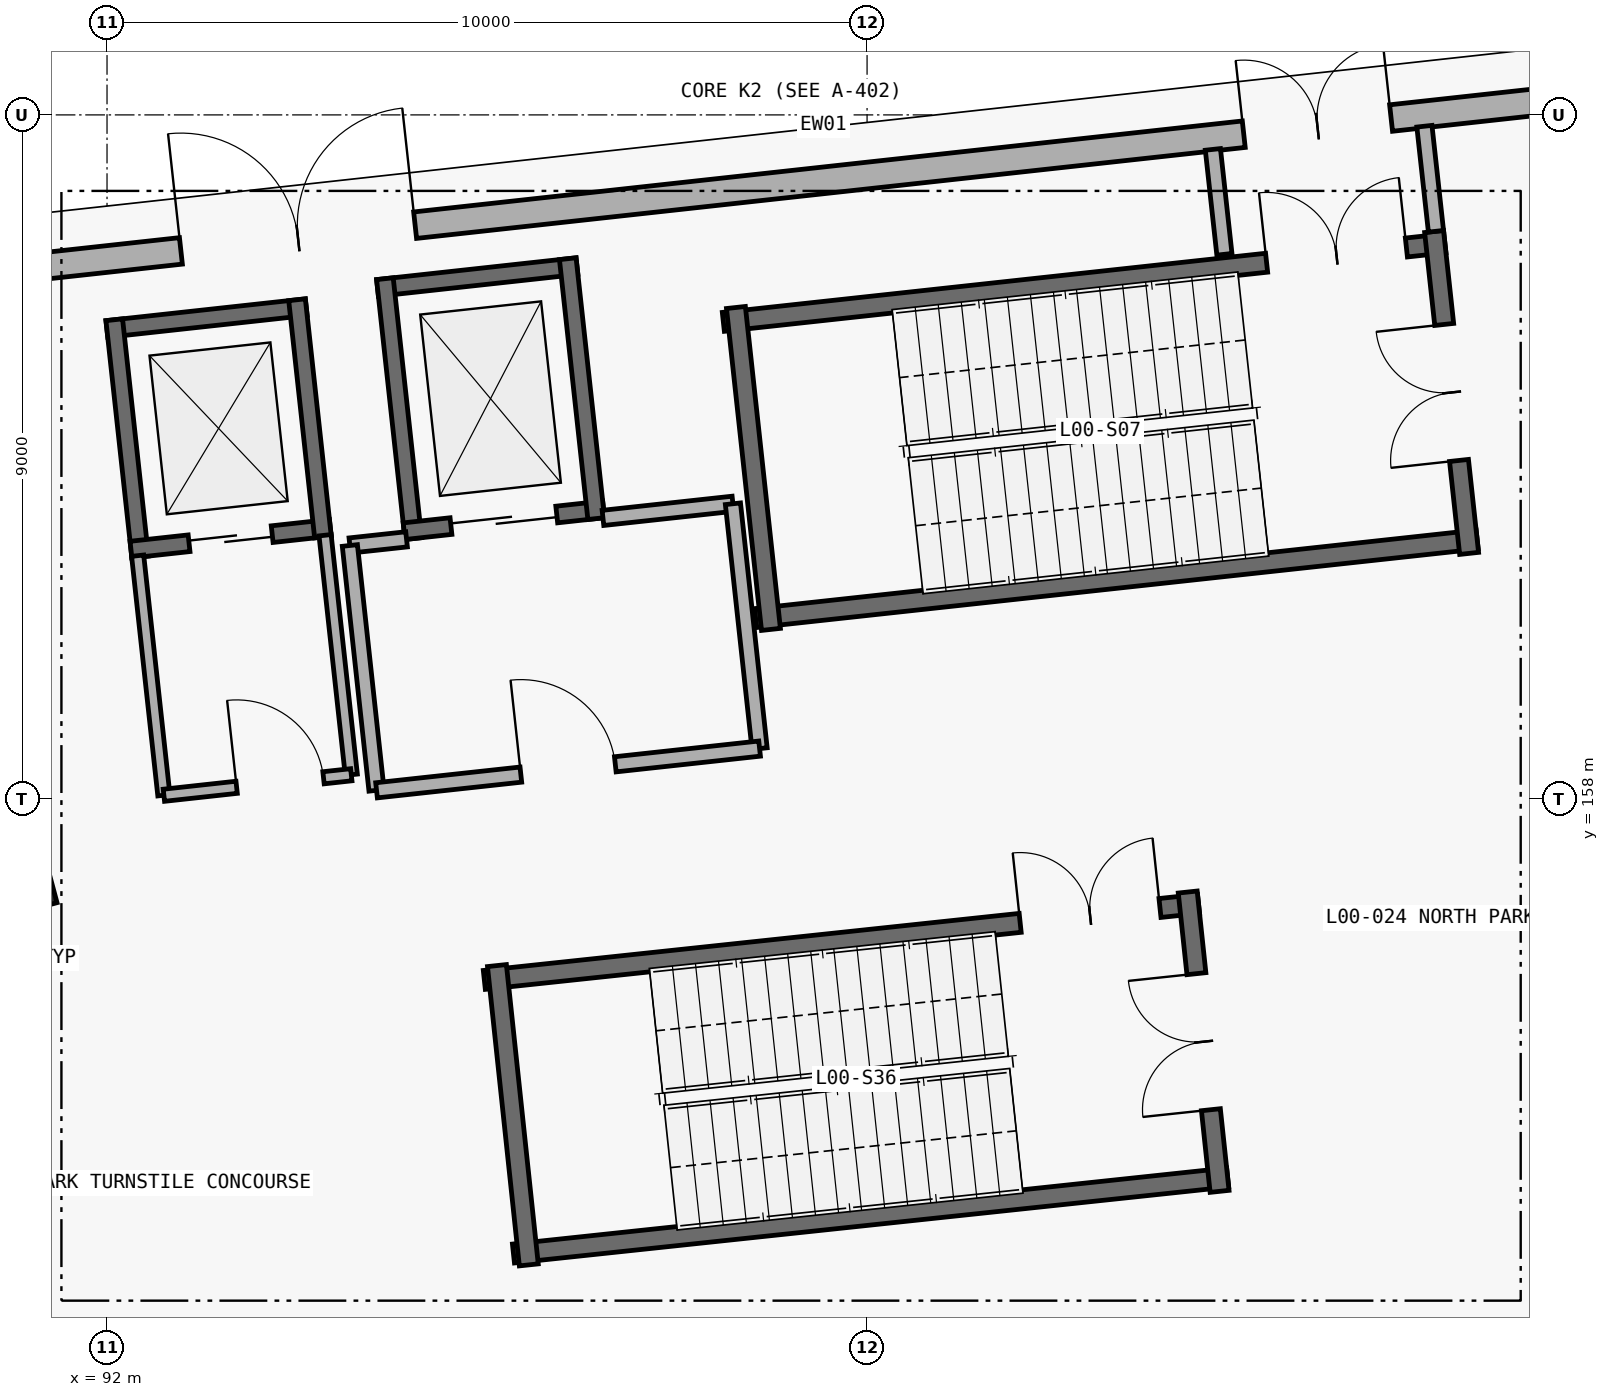
"""IFC4 building model, lengths in metres.
Left out: names, types, materials, properties, quantities, classifications, styles, units other than length and angle.
Written with IfcOpenShell. Run it as: python <this file> out.ifc"""

import sys

from ifc_helpers import new_model, si_unit, direction, frame, frame_2d, origin, origin_2d, place, context, subcontext, project, spatial, rectangle, extrude, element, fill, save


model = new_model("IFC4")
c1 = context("Model", 3, precision=1e-05, world=origin(), true_north=direction((0.0, 1.0)))
c2 = subcontext(c1, "Body", "Model", "MODEL_VIEW")
j1 = project(units=[si_unit("LENGTHUNIT", "METRE"), si_unit("PLANEANGLEUNIT", "RADIAN")], contexts=[c1])
p1 = place(None, origin())
s1 = spatial("IfcSite", under=j1, at=p1, CompositionType="ELEMENT")
p2 = place(p1, origin())
s2 = spatial("IfcBuilding", under=s1, at=p2, CompositionType="ELEMENT")
p3 = place(p2, origin())
s3 = spatial("IfcBuildingStorey", under=s2, at=p3, CompositionType="ELEMENT", Elevation=0.0)
p4 = place(p3, frame((90.699, 157.007, 0.0), z_axis=(0.0, 0.0, 1.0), x_axis=(-0.258819045103, 0.965925826289, 0.0)))
e1 = element("IfcColumn", 1, at=p4, inside=s3, PredefinedType="COLUMN", context=c2, shape_type="SweptSolid", body=[
    extrude(rectangle(XDim=1.05, YDim=1.05, at=origin_2d()), origin(), (0.0, 0.0, 1.0), 5.4),
])
p5 = place(p3, frame((89.157, 164.792, 0.0), z_axis=(0.0, 0.0, 1.0), x_axis=(0.994028735725, 0.10911861689, 0.0)))
e2 = element("IfcWall", 2, at=p5, inside=s3, PredefinedType="STANDARD", context=c2, shape_type="SweptSolid", body=[
    extrude(rectangle(XDim=22.452, YDim=0.35, at=frame_2d((11.226, 0.0))), origin(), (0.0, 0.0, 1.0), 4.165),
])
p6 = place(p5, frame((17.906, 0.0, 0.0)))
e3 = element("IfcOpeningElement", 3, at=p6, cuts=e2, PredefinedType="OPENING", context=c2, shape_type="SweptSolid", body=[
    extrude(rectangle(XDim=1.95, YDim=2.25, at=frame_2d((0.975, 1.125))), frame((0.0, 0.185, 0.0), z_axis=(0.0, -1.0, 0.0), x_axis=(1.0, 0.0, 0.0)), (0.0, 0.0, 1.0), 0.37),
])
p7 = place(p5, frame((3.838, 0.0, 0.0)))
e4 = element("IfcOpeningElement", 4, at=p7, cuts=e2, PredefinedType="OPENING", context=c2, shape_type="SweptSolid", body=[
    extrude(rectangle(XDim=3.1, YDim=2.58, at=frame_2d((1.55, 1.29))), frame((0.0, 0.185, 0.0), z_axis=(0.0, -1.0, 0.0), x_axis=(1.0, 0.0, 0.0)), (0.0, 0.0, 1.0), 0.37),
])
p8 = place(p3, frame((100.109, 164.277, 0.0), z_axis=(0.0, 0.0, 1.0), x_axis=(0.994127555169, 0.108214620337, 0.0)))
e5 = element("IfcWall", 5, at=p8, inside=s3, PredefinedType="SHEAR", context=c2, shape_type="SweptSolid", body=[
    extrude(rectangle(XDim=9.55, YDim=0.25, at=frame_2d((4.775, 0.0))), origin(), (0.0, 0.0, 1.0), 5.1),
])
p9 = place(p8, frame((7.19, 0.0, 0.0)))
e6 = element("IfcOpeningElement", 6, at=p9, cuts=e5, PredefinedType="OPENING", context=c2, shape_type="SweptSolid", body=[
    extrude(rectangle(XDim=1.85, YDim=2.3, at=frame_2d((0.925, 1.15))), frame((0.0, 0.135, 0.0), z_axis=(0.0, -1.0, 0.0), x_axis=(1.0, 0.0, 0.0)), (0.0, 0.0, 1.0), 0.27),
])
p10 = place(p3, frame((100.533, 160.38, 0.0), z_axis=(0.0, 0.0, 1.0), x_axis=(0.994127555169, 0.108214620337, 0.0)))
e7 = element("IfcWall", 7, at=p10, inside=s3, PredefinedType="SHEAR", context=c2, shape_type="SweptSolid", body=[
    extrude(rectangle(XDim=9.55, YDim=0.25, at=frame_2d((4.775, 0.0))), origin(), (0.0, 0.0, 1.0), 5.1),
])
p11 = place(p3, frame((109.921, 161.231, 0.0), z_axis=(0.0, 0.0, 1.0), x_axis=(-0.108198315262, 0.994129329903, 0.0)))
e8 = element("IfcWall", 8, at=p11, inside=s3, PredefinedType="SHEAR", context=c2, shape_type="SweptSolid", body=[
    extrude(rectangle(XDim=4.26, YDim=0.25, at=frame_2d((2.13, 0.0))), origin(), (0.0, 0.0, 1.0), 5.1),
])
p12 = place(p11, frame((1.23, 0.0, 0.0)))
e9 = element("IfcOpeningElement", 9, at=p12, cuts=e8, PredefinedType="OPENING", context=c2, shape_type="SweptSolid", body=[
    extrude(rectangle(XDim=1.8, YDim=2.25, at=frame_2d((0.9, 1.125))), frame((0.0, 0.135, 0.0), z_axis=(0.0, -1.0, 0.0), x_axis=(1.0, 0.0, 0.0)), (0.0, 0.0, 1.0), 0.27),
])
p13 = place(p3, frame((100.274, 164.466, 0.0), z_axis=(0.0, 0.0, 1.0), x_axis=(0.108204479885, -0.994128658944, 0.0)))
e10 = element("IfcWall", 10, at=p13, inside=s3, PredefinedType="SHEAR", context=c2, shape_type="SweptSolid", body=[
    extrude(rectangle(XDim=4.26, YDim=0.25, at=frame_2d((2.13, 0.0))), origin(), (0.0, 0.0, 1.0), 5.1),
])
p14 = place(p3, frame((96.964, 155.62, 0.0), z_axis=(0.0, 0.0, 1.0), x_axis=(0.994379889371, 0.105870844028, 0.0)))
e11 = element("IfcWall", 11, at=p14, inside=s3, PredefinedType="SHEAR", context=c2, shape_type="SweptSolid", body=[
    extrude(rectangle(XDim=9.45, YDim=0.25, at=frame_2d((4.725, 0.0))), origin(), (0.0, 0.0, 1.0), 5.1),
])
p15 = place(p14, frame((7.09, 0.0, 0.0)))
e12 = element("IfcOpeningElement", 12, at=p15, cuts=e11, PredefinedType="OPENING", context=c2, shape_type="SweptSolid", body=[
    extrude(rectangle(XDim=1.85, YDim=2.3, at=frame_2d((0.925, 1.15))), frame((0.0, 0.135, 0.0), z_axis=(0.0, -1.0, 0.0), x_axis=(1.0, 0.0, 0.0)), (0.0, 0.0, 1.0), 0.27),
])
p16 = place(p3, frame((97.347, 152.02, 0.0), z_axis=(0.0, 0.0, 1.0), x_axis=(0.994382608826, 0.105845298736, 0.0)))
e13 = element("IfcWall", 13, at=p16, inside=s3, PredefinedType="SHEAR", context=c2, shape_type="SweptSolid", body=[
    extrude(rectangle(XDim=9.45, YDim=0.25, at=frame_2d((4.725, 0.0))), origin(), (0.0, 0.0, 1.0), 5.1),
])
p17 = place(p3, frame((106.638, 152.838, 0.0), z_axis=(0.0, 0.0, 1.0), x_axis=(-0.105856095603, 0.994381459513, 0.0)))
e14 = element("IfcWall", 14, at=p17, inside=s3, PredefinedType="SHEAR", context=c2, shape_type="SweptSolid", body=[
    extrude(rectangle(XDim=3.96, YDim=0.25, at=frame_2d((1.98, 0.0))), origin(), (0.0, 0.0, 1.0), 5.1),
])
p18 = place(p17, frame((1.08, 0.0, 0.0)))
e15 = element("IfcOpeningElement", 15, at=p18, cuts=e14, PredefinedType="OPENING", context=c2, shape_type="SweptSolid", body=[
    extrude(rectangle(XDim=1.8, YDim=2.25, at=frame_2d((0.9, 1.125))), frame((0.0, 0.135, 0.0), z_axis=(0.0, -1.0, 0.0), x_axis=(1.0, 0.0, 0.0)), (0.0, 0.0, 1.0), 0.27),
])
p19 = place(p3, frame((97.13, 155.808, 0.0), z_axis=(0.0, 0.0, 1.0), x_axis=(0.105856095603, -0.994381459513, 0.0)))
e16 = element("IfcWall", 16, at=p19, inside=s3, PredefinedType="SHEAR", context=c2, shape_type="SweptSolid", body=[
    extrude(rectangle(XDim=3.96, YDim=0.25, at=frame_2d((1.98, 0.0))), origin(), (0.0, 0.0, 1.0), 5.1),
])
p20 = place(p3, frame((109.485, 165.469, 0.0), z_axis=(0.0, 0.0, 1.0), x_axis=(-0.109371701479, 0.994000920983, 0.0)))
e17 = element("IfcWall", 17, at=p20, inside=s3, PredefinedType="PARTITIONING", context=c2, shape_type="SweptSolid", body=[
    extrude(rectangle(XDim=1.391, YDim=0.2, at=frame_2d((0.695, 0.0))), origin(), (0.0, 0.0, 1.0), 4.165),
])
p21 = place(p3, frame((106.701, 165.166, 0.0), z_axis=(0.0, 0.0, 1.0), x_axis=(-0.109022528394, 0.994039279054, 0.0)))
e18 = element("IfcWall", 18, at=p21, inside=s3, PredefinedType="PARTITIONING", context=c2, shape_type="SweptSolid", body=[
    extrude(rectangle(XDim=1.388, YDim=0.2, at=frame_2d((0.694, 0.0))), origin(), (0.0, 0.0, 1.0), 4.165),
])
p22 = place(p3, frame((98.183, 165.011, 0.0), z_axis=(0.0, 0.0, 1.0), x_axis=(-0.994077313431, -0.108675180804, 0.0)))
e19 = element("IfcWall", 19, at=p22, inside=s3, PredefinedType="SHEAR", context=c2, shape_type="SweptSolid", body=[
    extrude(rectangle(XDim=2.64, YDim=0.22, at=frame_2d((1.32, 0.0))), origin(), (0.0, 0.0, 1.0), 5.1),
])
p23 = place(p3, frame((95.656, 164.845, 0.0), z_axis=(0.0, 0.0, 1.0), x_axis=(0.108748511736, -0.994069293961, 0.0)))
e20 = element("IfcWall", 20, at=p23, inside=s3, PredefinedType="SHEAR", context=c2, shape_type="SweptSolid", body=[
    extrude(rectangle(XDim=3.439, YDim=0.22, at=frame_2d((1.72, 0.0))), origin(), (0.0, 0.0, 1.0), 5.1),
])
p24 = place(p3, frame((95.909, 161.523, 0.0), z_axis=(0.0, 0.0, 1.0), x_axis=(0.994067317545, 0.108766576613, 0.0)))
e21 = element("IfcWall", 21, at=p24, inside=s3, PredefinedType="SHEAR", context=c2, shape_type="SweptSolid", body=[
    extrude(rectangle(XDim=2.64, YDim=0.22, at=frame_2d((1.32, 0.0))), origin(), (0.0, 0.0, 1.0), 5.1),
])
p25 = place(p24, frame((0.62, 0.0, 0.0)))
e22 = element("IfcOpeningElement", 22, at=p25, cuts=e21, PredefinedType="OPENING", context=c2, shape_type="SweptSolid", body=[
    extrude(rectangle(XDim=1.4, YDim=2.2, at=frame_2d((0.7, 1.1))), frame((0.0, 0.12, 0.0), z_axis=(0.0, -1.0, 0.0), x_axis=(1.0, 0.0, 0.0)), (0.0, 0.0, 1.0), 0.24),
])
p26 = place(p3, frame((98.436, 161.689, 0.0), z_axis=(0.0, 0.0, 1.0), x_axis=(-0.108748511736, 0.994069293961, 0.0)))
e23 = element("IfcWall", 23, at=p26, inside=s3, PredefinedType="SHEAR", context=c2, shape_type="SweptSolid", body=[
    extrude(rectangle(XDim=3.439, YDim=0.22, at=frame_2d((1.72, 0.0))), origin(), (0.0, 0.0, 1.0), 5.1),
])
p27 = place(p3, frame((95.195, 161.335, 0.0), z_axis=(0.0, 0.0, 1.0), x_axis=(0.994146742738, 0.108038205757, 0.0)))
e24 = element("IfcWall", 24, at=p27, inside=s3, PredefinedType="PARTITIONING", context=c2, shape_type="SweptSolid", body=[
    extrude(rectangle(XDim=0.75, YDim=0.2, at=frame_2d((0.375, 0.0))), origin(), (0.0, 0.0, 1.0), 5.08),
])
p28 = place(p3, frame((98.525, 161.698, 0.0), z_axis=(0.0, 0.0, 1.0), x_axis=(0.994135511072, 0.108141507414, 0.0)))
e25 = element("IfcWall", 25, at=p28, inside=s3, PredefinedType="PARTITIONING", context=c2, shape_type="SweptSolid", body=[
    extrude(rectangle(XDim=1.72, YDim=0.2, at=frame_2d((0.86, 0.0))), origin(), (0.0, 0.0, 1.0), 5.08),
])
for number, where, z_axis, x_axis in (
    (26, (95.195, 161.335, 0.0), (0.0, 0.0, 1.0), (0.108, -0.994, 0.0)),
    (27, (100.235, 161.884, 0.0), (0.0, 0.0, 1.0), (0.108, -0.994, 0.0)),
):
    element("IfcWall", number, at=place(p3, frame(where, z_axis=z_axis, x_axis=x_axis)), inside=s3, PredefinedType="PARTITIONING", context=c2, shape_type="SweptSolid", body=[
        extrude(rectangle(XDim=3.24, YDim=0.2, at=frame_2d((1.62, 0.0))), origin(), (0.0, 0.0, 1.0), 5.08),
    ])
p29 = place(p3, frame((95.546, 158.114, 0.0), z_axis=(0.0, 0.0, 1.0), x_axis=(0.994118117986, 0.108301281116, 0.0)))
e28 = element("IfcWall", 28, at=p29, inside=s3, PredefinedType="PARTITIONING", context=c2, shape_type="SweptSolid", body=[
    extrude(rectangle(XDim=5.07, YDim=0.2, at=frame_2d((2.535, 0.0))), origin(), (0.0, 0.0, 1.0), 5.08),
])
p30 = place(p29, frame((1.91, 0.0, 0.0)))
e29 = element("IfcOpeningElement", 29, at=p30, cuts=e28, PredefinedType="OPENING", context=c2, shape_type="SweptSolid", body=[
    extrude(rectangle(XDim=1.25, YDim=2.2, at=frame_2d((0.625, 1.1))), frame((0.0, 0.11, 0.0), z_axis=(0.0, -1.0, 0.0), x_axis=(1.0, 0.0, 0.0)), (0.0, 0.0, 1.0), 0.22),
])
p31 = place(p3, frame((94.621, 164.471, 0.0), z_axis=(0.0, 0.0, 1.0), x_axis=(-0.994072941705, -0.108715162556, 0.0)))
e30 = element("IfcWall", 30, at=p31, inside=s3, PredefinedType="SHEAR", context=c2, shape_type="SweptSolid", body=[
    extrude(rectangle(XDim=2.639, YDim=0.22, at=frame_2d((1.319, 0.0))), origin(), (0.0, 0.0, 1.0), 5.1),
])
p32 = place(p3, frame((92.095, 164.305, 0.0), z_axis=(0.0, 0.0, 1.0), x_axis=(0.108638937738, -0.99408127495, 0.0)))
e31 = element("IfcWall", 31, at=p32, inside=s3, PredefinedType="SHEAR", context=c2, shape_type="SweptSolid", body=[
    extrude(rectangle(XDim=3.139, YDim=0.22, at=frame_2d((1.57, 0.0))), origin(), (0.0, 0.0, 1.0), 5.1),
])
p33 = place(p3, frame((92.315, 161.281, 0.0), z_axis=(0.0, 0.0, 1.0), x_axis=(0.994062938508, 0.108806591184, 0.0)))
e32 = element("IfcWall", 32, at=p33, inside=s3, PredefinedType="SHEAR", context=c2, shape_type="SweptSolid", body=[
    extrude(rectangle(XDim=2.639, YDim=0.22, at=frame_2d((1.319, 0.0))), origin(), (0.0, 0.0, 1.0), 5.1),
])
p34 = place(p33, frame((0.769, 0.0, 0.0)))
e33 = element("IfcOpeningElement", 33, at=p34, cuts=e32, PredefinedType="OPENING", context=c2, shape_type="SweptSolid", body=[
    extrude(rectangle(XDim=1.1, YDim=2.15, at=frame_2d((0.55, 1.075))), frame((0.0, 0.12, 0.0), z_axis=(0.0, -1.0, 0.0), x_axis=(1.0, 0.0, 0.0)), (0.0, 0.0, 1.0), 0.24),
])
p35 = place(p3, frame((94.841, 161.447, 0.0), z_axis=(0.0, 0.0, 1.0), x_axis=(-0.108630539984, 0.99408219267, 0.0)))
e34 = element("IfcWall", 34, at=p35, inside=s3, PredefinedType="SHEAR", context=c2, shape_type="SweptSolid", body=[
    extrude(rectangle(XDim=3.14, YDim=0.22, at=frame_2d((1.57, 0.0))), origin(), (0.0, 0.0, 1.0), 5.1),
])
p36 = place(p3, frame((92.403, 161.201, 0.0), z_axis=(0.0, 0.0, 1.0), x_axis=(0.108800302456, -0.99406362683, 0.0)))
e35 = element("IfcWall", 35, at=p36, inside=s3, PredefinedType="PARTITIONING", context=c2, shape_type="SweptSolid", body=[
    extrude(rectangle(XDim=3.171, YDim=0.16, at=frame_2d((1.585, 0.0))), origin(), (0.0, 0.0, 1.0), 5.08),
])
p37 = place(p3, frame((94.869, 161.47, 0.0), z_axis=(0.0, 0.0, 1.0), x_axis=(0.108909733757, -0.994051643474, 0.0)))
e36 = element("IfcWall", 36, at=p37, inside=s3, PredefinedType="PARTITIONING", context=c2, shape_type="SweptSolid", body=[
    extrude(rectangle(XDim=3.17, YDim=0.16, at=frame_2d((1.585, 0.0))), origin(), (0.0, 0.0, 1.0), 5.08),
])
p38 = place(p3, frame((92.748, 158.049, 0.0), z_axis=(0.0, 0.0, 1.0), x_axis=(0.994058887757, 0.1088435927, 0.0)))
e37 = element("IfcWall", 37, at=p38, inside=s3, PredefinedType="PARTITIONING", context=c2, shape_type="SweptSolid", body=[
    extrude(rectangle(XDim=2.481, YDim=0.16, at=frame_2d((1.24, 0.0))), origin(), (0.0, 0.0, 1.0), 5.08),
])
p39 = place(p38, frame((0.963, 0.0, 0.0)))
e38 = element("IfcOpeningElement", 38, at=p39, cuts=e37, PredefinedType="OPENING", context=c2, shape_type="SweptSolid", body=[
    extrude(rectangle(XDim=1.15, YDim=2.2, at=frame_2d((0.575, 1.1))), frame((0.0, 0.09, 0.0), z_axis=(0.0, -1.0, 0.0), x_axis=(1.0, 0.0, 0.0)), (0.0, 0.0, 1.0), 0.18),
])
p40 = place(p6, origin())
e39 = element("IfcDoor", 39, at=p40, inside=s3, OperationType="DOUBLE_DOOR_SINGLE_SWING", PredefinedType="DOOR", context=c2, shape_type="SweptSolid", body=[
    extrude(rectangle(XDim=1.95, YDim=2.25, at=frame_2d((0.975, 1.125))), frame((0.0, 0.025, 0.0), z_axis=(0.0, -1.0, 0.0), x_axis=(1.0, 0.0, 0.0)), (0.0, 0.0, 1.0), 0.05),
])
fill(e3, e39)
p41 = place(p7, origin())
e40 = element("IfcDoor", 40, at=p41, inside=s3, OperationType="DOUBLE_DOOR_SINGLE_SWING", PredefinedType="DOOR", context=c2, shape_type="SweptSolid", body=[
    extrude(rectangle(XDim=3.1, YDim=2.58, at=frame_2d((1.55, 1.29))), frame((0.0, 0.025, 0.0), z_axis=(0.0, -1.0, 0.0), x_axis=(1.0, 0.0, 0.0)), (0.0, 0.0, 1.0), 0.05),
])
fill(e4, e40)
p42 = place(p12, origin())
e41 = element("IfcDoor", 41, at=p42, inside=s3, OperationType="DOUBLE_DOOR_SINGLE_SWING", PredefinedType="DOOR", context=c2, shape_type="SweptSolid", body=[
    extrude(rectangle(XDim=1.8, YDim=2.25, at=frame_2d((0.9, 1.125))), frame((0.0, 0.025, 0.0), z_axis=(0.0, -1.0, 0.0), x_axis=(1.0, 0.0, 0.0)), (0.0, 0.0, 1.0), 0.05),
])
fill(e9, e41)
p43 = place(p9, origin())
e42 = element("IfcDoor", 42, at=p43, inside=s3, OperationType="DOUBLE_DOOR_SINGLE_SWING", PredefinedType="DOOR", context=c2, shape_type="SweptSolid", body=[
    extrude(rectangle(XDim=1.85, YDim=2.3, at=frame_2d((0.925, 1.15))), frame((0.0, 0.025, 0.0), z_axis=(0.0, -1.0, 0.0), x_axis=(1.0, 0.0, 0.0)), (0.0, 0.0, 1.0), 0.05),
])
fill(e6, e42)
p44 = place(p18, origin())
e43 = element("IfcDoor", 43, at=p44, inside=s3, OperationType="DOUBLE_DOOR_SINGLE_SWING", PredefinedType="DOOR", context=c2, shape_type="SweptSolid", body=[
    extrude(rectangle(XDim=1.8, YDim=2.25, at=frame_2d((0.9, 1.125))), frame((0.0, 0.025, 0.0), z_axis=(0.0, -1.0, 0.0), x_axis=(1.0, 0.0, 0.0)), (0.0, 0.0, 1.0), 0.05),
])
fill(e15, e43)
p45 = place(p15, origin())
e44 = element("IfcDoor", 44, at=p45, inside=s3, OperationType="DOUBLE_DOOR_SINGLE_SWING", PredefinedType="DOOR", context=c2, shape_type="SweptSolid", body=[
    extrude(rectangle(XDim=1.85, YDim=2.3, at=frame_2d((0.925, 1.15))), frame((0.0, 0.025, 0.0), z_axis=(0.0, -1.0, 0.0), x_axis=(1.0, 0.0, 0.0)), (0.0, 0.0, 1.0), 0.05),
])
fill(e12, e44)
p46 = place(p25, origin())
e45 = element("IfcDoor", 45, at=p46, inside=s3, OperationType="SLIDING_TO_LEFT", PredefinedType="DOOR", context=c2, shape_type="SweptSolid", body=[
    extrude(rectangle(XDim=1.4, YDim=2.2, at=frame_2d((0.7, 1.1))), frame((0.0, 0.025, 0.0), z_axis=(0.0, -1.0, 0.0), x_axis=(1.0, 0.0, 0.0)), (0.0, 0.0, 1.0), 0.05),
])
fill(e22, e45)
p47 = place(p30, origin())
e46 = element("IfcDoor", 46, at=p47, inside=s3, OperationType="SINGLE_SWING_LEFT", PredefinedType="DOOR", context=c2, shape_type="SweptSolid", body=[
    extrude(rectangle(XDim=1.25, YDim=2.2, at=frame_2d((0.625, 1.1))), frame((0.0, 0.025, 0.0), z_axis=(0.0, -1.0, 0.0), x_axis=(1.0, 0.0, 0.0)), (0.0, 0.0, 1.0), 0.05),
])
fill(e29, e46)
p48 = place(p34, origin())
e47 = element("IfcDoor", 47, at=p48, inside=s3, OperationType="SLIDING_TO_LEFT", PredefinedType="DOOR", context=c2, shape_type="SweptSolid", body=[
    extrude(rectangle(XDim=1.1, YDim=2.15, at=frame_2d((0.55, 1.075))), frame((0.0, 0.025, 0.0), z_axis=(0.0, -1.0, 0.0), x_axis=(1.0, 0.0, 0.0)), (0.0, 0.0, 1.0), 0.05),
])
fill(e33, e47)
p49 = place(p39, origin())
e48 = element("IfcDoor", 48, at=p49, inside=s3, OperationType="SINGLE_SWING_LEFT", PredefinedType="DOOR", context=c2, shape_type="SweptSolid", body=[
    extrude(rectangle(XDim=1.15, YDim=2.2, at=frame_2d((0.575, 1.1))), frame((0.0, 0.025, 0.0), z_axis=(0.0, -1.0, 0.0), x_axis=(1.0, 0.0, 0.0)), (0.0, 0.0, 1.0), 0.05),
])
fill(e38, e48)
save(model, sys.argv[1])
